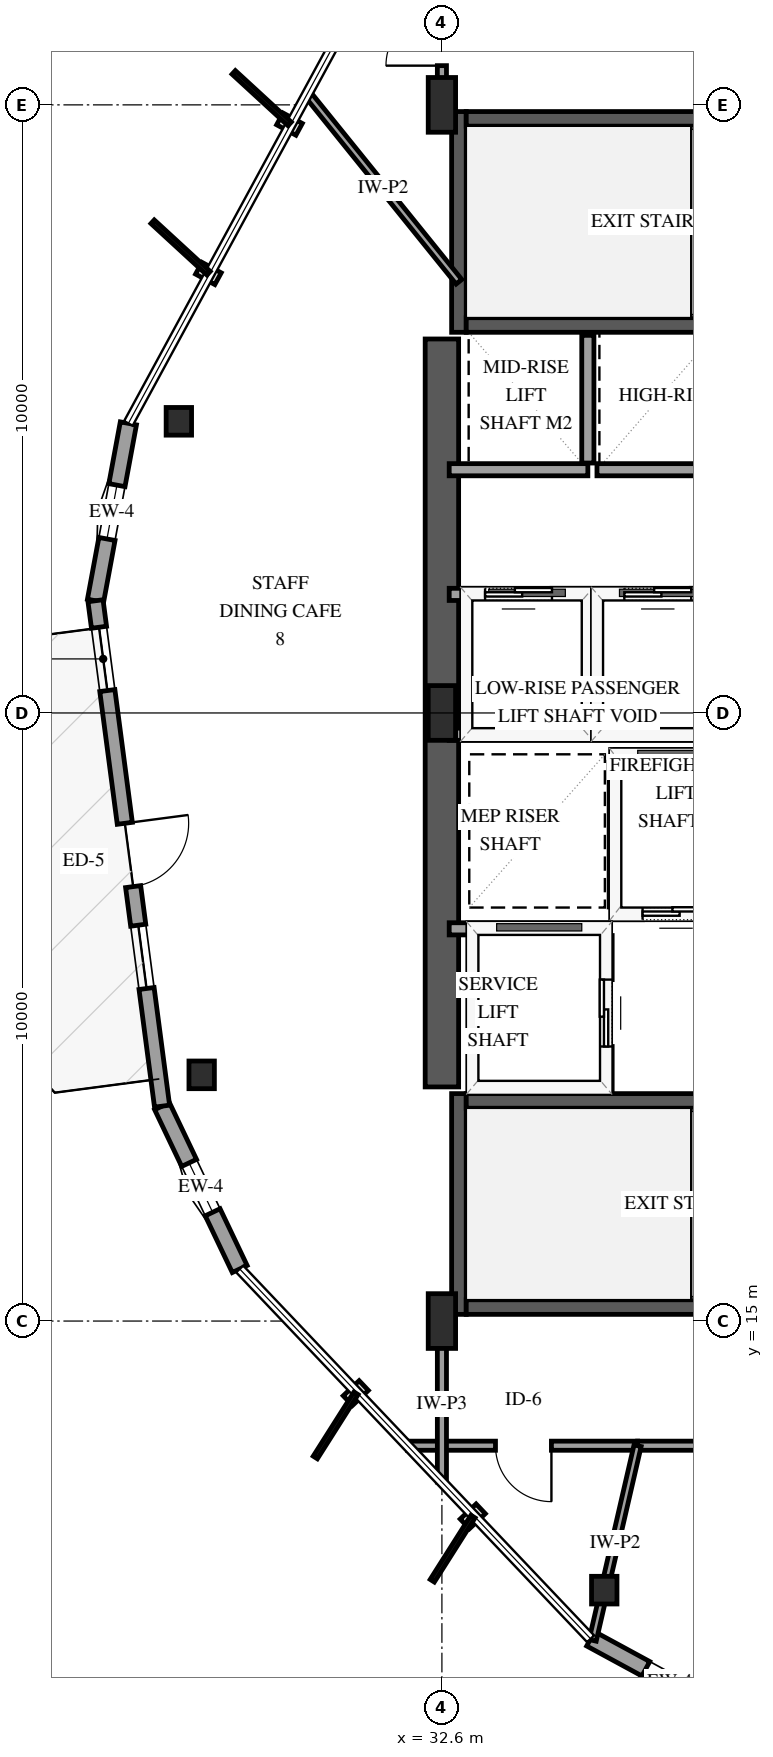
"""IFC4 building model, lengths in metres.
Left out: names, types, materials, properties, quantities, classifications, styles, units other than length and angle.
Written with IfcOpenShell. Run it as: python <this file> out.ifc"""

import sys

from ifc_helpers import new_model, si_unit, direction, frame, frame_2d, origin, origin_2d, place, context, subcontext, project, spatial, rectangle, i_section, extrude, element, fill, save


model = new_model("IFC4")
c1 = context("Model", 3, precision=1e-05, world=origin(), true_north=direction((0.0, 1.0)))
c2 = subcontext(c1, "Body", "Model", "MODEL_VIEW")
j1 = project(units=[si_unit("LENGTHUNIT", "METRE"), si_unit("PLANEANGLEUNIT", "RADIAN")], contexts=[c1])
p1 = place(None, origin())
s1 = spatial("IfcSite", under=j1, at=p1, CompositionType="ELEMENT")
p2 = place(p1, origin())
s2 = spatial("IfcBuilding", under=s1, at=p2, CompositionType="ELEMENT")
p3 = place(p2, frame((0.0, 0.0, 126.4)))
s3 = spatial("IfcBuildingStorey", under=s2, at=p3, CompositionType="ELEMENT", Elevation=126.4)
p4 = place(p3, frame((32.88, 15.11, 0.0), z_axis=(0.0, 0.0, 1.0), x_axis=(0.0, 1.0, 0.0)))
e1 = element("IfcWall", 1, at=p4, inside=s3, PredefinedType="SHEAR", context=c2, shape_type="SweptSolid", body=[
    extrude(rectangle(XDim=3.63, YDim=0.24, at=frame_2d((1.815, 0.0))), origin(), (0.0, 0.0, 1.0), 3.9),
])
for number, where, z_axis, x_axis in (
    (2, (33.0, 15.23, 0.0), (0.0, 0.0, 1.0), (1.0, 0.0, 0.0)),
    (3, (33.0, 18.62, 0.0), (0.0, 0.0, 1.0), (1.0, 0.0, 0.0)),
):
    element("IfcWall", number, at=place(p3, frame(where, z_axis=z_axis, x_axis=x_axis)), inside=s3, PredefinedType="SHEAR", context=c2, shape_type="SweptSolid", body=[
        extrude(rectangle(XDim=8.0, YDim=0.24, at=frame_2d((4.0, 0.0))), origin(), (0.0, 0.0, 1.0), 3.9),
    ])
p5 = place(p3, frame((32.88, 31.26, 0.0), z_axis=(0.0, 0.0, 1.0), x_axis=(0.0, 1.0, 0.0)))
e4 = element("IfcWall", 4, at=p5, inside=s3, PredefinedType="SHEAR", context=c2, shape_type="SweptSolid", body=[
    extrude(rectangle(XDim=3.63, YDim=0.24, at=frame_2d((1.815, 0.0))), origin(), (0.0, 0.0, 1.0), 3.9),
])
for number, where, z_axis, x_axis in (
    (5, (33.0, 31.38, 0.0), (0.0, 0.0, 1.0), (1.0, 0.0, 0.0)),
    (6, (33.0, 34.77, 0.0), (0.0, 0.0, 1.0), (1.0, 0.0, 0.0)),
):
    element("IfcWall", number, at=place(p3, frame(where, z_axis=z_axis, x_axis=x_axis)), inside=s3, PredefinedType="SHEAR", context=c2, shape_type="SweptSolid", body=[
        extrude(rectangle(XDim=8.0, YDim=0.24, at=frame_2d((4.0, 0.0))), origin(), (0.0, 0.0, 1.0), 3.9),
    ])
p6 = place(p3, frame((32.6, 18.85, 0.0), z_axis=(0.0, 0.0, 1.0), x_axis=(0.0, 1.0, 0.0)))
e7 = element("IfcWall", 7, at=p6, inside=s3, PredefinedType="SHEAR", context=c2, shape_type="SweptSolid", body=[
    extrude(rectangle(XDim=12.3, YDim=0.55, at=frame_2d((6.15, 0.0))), origin(), (0.0, 0.0, 1.0), 3.9),
])
for number, where, z_axis, x_axis in (
    (8, (32.6, 15.0, 0.0), (0.0, 0.0, 1.0), (1.0, 0.0, 0.0)),
    (9, (32.6, 25.0, 0.0), (0.0, 0.0, 1.0), (1.0, 0.0, 0.0)),
    (10, (32.6, 35.0, 0.0), (0.0, 0.0, 1.0), (1.0, 0.0, 0.0)),
):
    element("IfcColumn", number, at=place(p3, frame(where, z_axis=z_axis, x_axis=x_axis)), inside=s3, PredefinedType="PILASTER", context=c2, shape_type="SweptSolid", body=[
        extrude(rectangle(XDim=0.45, YDim=0.9, at=origin_2d()), origin(), (0.0, 0.0, 1.0), 3.9),
    ])
for number, where, z_axis, x_axis in (
    (11, (28.274, 29.796, 0.0), (0.0, 0.0, 1.0), (1.0, 0.0, 0.0)),
    (12, (28.649, 19.049, 0.0), (0.0, 0.0, 1.0), (1.0, 0.0, 0.0)),
    (13, (35.27, 10.575, 0.0), (0.0, 0.0, 1.0), (1.0, 0.0, 0.0)),
):
    element("IfcColumn", number, at=place(p3, frame(where, z_axis=z_axis, x_axis=x_axis)), inside=s3, PredefinedType="COLUMN", context=c2, shape_type="SweptSolid", body=[
        extrude(i_section(OverallWidth=0.418, OverallDepth=0.455, WebThickness=0.042, FlangeThickness=0.068, FilletRadius=0.038, at=origin_2d()), origin(), (0.0, 0.0, 1.0), 3.9),
    ])
p7 = place(p3, frame((27.444, 29.762, 0.0), z_axis=(0.0, 0.0, 1.0), x_axis=(-0.182295553122, -0.983243780205, 0.0)))
e14 = element("IfcWall", 14, at=p7, inside=s3, PredefinedType="SOLIDWALL", context=c2, shape_type="SweptSolid", body=[
    extrude(rectangle(XDim=2.967, YDim=0.27, at=frame_2d((1.483, 0.0))), origin(), (0.0, 0.0, 1.0), 2.979),
])
p8 = place(p7, frame((1.033, 0.0, 0.75)))
e15 = element("IfcOpeningElement", 15, at=p8, cuts=e14, PredefinedType="OPENING", context=c2, shape_type="SweptSolid", body=[
    extrude(rectangle(XDim=0.9, YDim=1.5, at=frame_2d((0.45, 0.75))), frame((0.0, 0.145, 0.0), z_axis=(0.0, -1.0, 0.0), x_axis=(1.0, 0.0, 0.0)), (0.0, 0.0, 1.0), 0.29),
])
p9 = place(p3, frame((27.998, 18.534, 0.0), z_axis=(0.0, 0.0, 1.0), x_axis=(0.430511722547, -0.902584985887, 0.0)))
e16 = element("IfcWall", 16, at=p9, inside=s3, PredefinedType="SOLIDWALL", context=c2, shape_type="SweptSolid", body=[
    extrude(rectangle(XDim=2.967, YDim=0.27, at=frame_2d((1.483, 0.0))), origin(), (0.0, 0.0, 1.0), 2.979),
])
p10 = place(p9, frame((1.033, 0.0, 0.75)))
e17 = element("IfcOpeningElement", 17, at=p10, cuts=e16, PredefinedType="OPENING", context=c2, shape_type="SweptSolid", body=[
    extrude(rectangle(XDim=0.9, YDim=1.5, at=frame_2d((0.45, 0.75))), frame((0.0, 0.145, 0.0), z_axis=(0.0, -1.0, 0.0), x_axis=(1.0, 0.0, 0.0)), (0.0, 0.0, 1.0), 0.29),
])
p11 = place(p3, frame((26.903, 26.845, 0.0), z_axis=(0.0, 0.0, 1.0), x_axis=(0.130551689343, -0.99144150428, 0.0)))
e18 = element("IfcWall", 18, at=p11, inside=s3, PredefinedType="SOLIDWALL", context=c2, shape_type="SweptSolid", body=[
    extrude(rectangle(XDim=8.384, YDim=0.25, at=frame_2d((4.192, 0.0))), origin(), (0.0, 0.0, 1.0), 2.979),
])
p12 = place(p11, frame((3.692, 0.0, 0.0)))
e19 = element("IfcOpeningElement", 19, at=p12, cuts=e18, PredefinedType="OPENING", context=c2, shape_type="SweptSolid", body=[
    extrude(rectangle(XDim=1.05, YDim=2.15, at=frame_2d((0.525, 1.075))), frame((0.0, 0.135, 0.0), z_axis=(0.0, -1.0, 0.0), x_axis=(1.0, 0.0, 0.0)), (0.0, 0.0, 1.0), 0.27),
])
p13 = place(p11, frame((0.44, 0.0, 0.72)))
e20 = element("IfcOpeningElement", 20, at=p13, cuts=e18, PredefinedType="OPENING", context=c2, shape_type="SweptSolid", body=[
    extrude(rectangle(XDim=1.05, YDim=1.55, at=frame_2d((0.525, 0.775))), frame((0.0, 0.135, 0.0), z_axis=(0.0, -1.0, 0.0), x_axis=(1.0, 0.0, 0.0)), (0.0, 0.0, 1.0), 0.27),
])
p14 = place(p11, frame((5.382, 0.0, 0.72)))
e21 = element("IfcOpeningElement", 21, at=p14, cuts=e18, PredefinedType="OPENING", context=c2, shape_type="SweptSolid", body=[
    extrude(rectangle(XDim=1.05, YDim=1.55, at=frame_2d((0.525, 0.775))), frame((0.0, 0.135, 0.0), z_axis=(0.0, -1.0, 0.0), x_axis=(1.0, 0.0, 0.0)), (0.0, 0.0, 1.0), 0.27),
])
p15 = place(p3, frame((35.046, 9.775, 0.0), z_axis=(0.0, 0.0, 1.0), x_axis=(0.878806101886, -0.477179039028, 0.0)))
e22 = element("IfcWall", 22, at=p15, inside=s3, PredefinedType="SOLIDWALL", context=c2, shape_type="SweptSolid", body=[
    extrude(rectangle(XDim=2.967, YDim=0.27, at=frame_2d((1.483, 0.0))), origin(), (0.0, 0.0, 1.0), 2.979),
])
p16 = place(p15, frame((1.033, 0.0, 0.75)))
e23 = element("IfcOpeningElement", 23, at=p16, cuts=e22, PredefinedType="OPENING", context=c2, shape_type="SweptSolid", body=[
    extrude(rectangle(XDim=0.9, YDim=1.5, at=frame_2d((0.45, 0.75))), frame((0.0, 0.145, 0.0), z_axis=(0.0, -1.0, 0.0), x_axis=(1.0, 0.0, 0.0)), (0.0, 0.0, 1.0), 0.29),
])
p17 = place(p3, frame((35.45, 21.7, 0.0), z_axis=(0.0, 0.0, 1.0), x_axis=(1.0, 0.0, 0.0)))
e24 = element("IfcWall", 24, at=p17, inside=s3, PredefinedType="SOLIDWALL", context=c2, shape_type="SweptSolid", body=[
    extrude(rectangle(XDim=2.0, YDim=0.2, at=frame_2d((1.0, 0.0))), origin(), (0.0, 0.0, 1.0), 3.6),
])
p18 = place(p17, frame((0.45, 0.0, 0.0)))
e25 = element("IfcOpeningElement", 25, at=p18, cuts=e24, PredefinedType="OPENING", context=c2, shape_type="SweptSolid", body=[
    extrude(rectangle(XDim=1.1, YDim=2.15, at=frame_2d((0.55, 1.075))), frame((0.0, 0.11, 0.0), z_axis=(0.0, -1.0, 0.0), x_axis=(1.0, 0.0, 0.0)), (0.0, 0.0, 1.0), 0.22),
])
p19 = place(p3, frame((35.45, 24.3, 0.0), z_axis=(0.0, 0.0, 1.0), x_axis=(1.0, 0.0, 0.0)))
e26 = element("IfcWall", 26, at=p19, inside=s3, PredefinedType="SOLIDWALL", context=c2, shape_type="SweptSolid", body=[
    extrude(rectangle(XDim=2.0, YDim=0.2, at=frame_2d((1.0, 0.0))), origin(), (0.0, 0.0, 1.0), 3.6),
])
p20 = place(p3, frame((35.45, 21.81, 0.0), z_axis=(0.0, 0.0, 1.0), x_axis=(0.0, 1.0, 0.0)))
e27 = element("IfcWall", 27, at=p20, inside=s3, PredefinedType="SOLIDWALL", context=c2, shape_type="SweptSolid", body=[
    extrude(rectangle(XDim=2.38, YDim=0.2, at=frame_2d((1.19, 0.0))), origin(), (0.0, 0.0, 1.0), 3.6),
])
p21 = place(p3, frame((32.72, 21.45, 0.0), z_axis=(0.0, 0.0, 1.0), x_axis=(1.0, 0.0, 0.0)))
e28 = element("IfcWall", 28, at=p21, inside=s3, PredefinedType="SOLIDWALL", context=c2, shape_type="SweptSolid", body=[
    extrude(rectangle(XDim=2.58, YDim=0.2, at=frame_2d((1.29, 0.0))), origin(), (0.0, 0.0, 1.0), 3.6),
])
p22 = place(p3, frame((35.3, 18.79, 0.0), z_axis=(0.0, 0.0, 1.0), x_axis=(0.0, 1.0, 0.0)))
e29 = element("IfcWall", 29, at=p22, inside=s3, PredefinedType="SOLIDWALL", context=c2, shape_type="SweptSolid", body=[
    extrude(rectangle(XDim=2.55, YDim=0.2, at=frame_2d((1.275, 0.0))), origin(), (0.0, 0.0, 1.0), 3.6),
])
p23 = place(p22, frame((0.725, 0.0, 0.0)))
e30 = element("IfcOpeningElement", 30, at=p23, cuts=e29, PredefinedType="OPENING", context=c2, shape_type="SweptSolid", body=[
    extrude(rectangle(XDim=1.1, YDim=2.15, at=frame_2d((0.55, 1.075))), frame((0.0, 0.11, 0.0), z_axis=(0.0, -1.0, 0.0), x_axis=(1.0, 0.0, 0.0)), (0.0, 0.0, 1.0), 0.22),
])
p24 = place(p3, frame((32.72, 24.65, 0.0), z_axis=(0.0, 0.0, 1.0), x_axis=(1.0, 0.0, 0.0)))
e31 = element("IfcWall", 31, at=p24, inside=s3, PredefinedType="SOLIDWALL", context=c2, shape_type="SweptSolid", body=[
    extrude(rectangle(XDim=2.28, YDim=0.2, at=frame_2d((1.14, 0.0))), origin(), (0.0, 0.0, 1.0), 3.6),
])
p25 = place(p3, frame((32.72, 26.95, 0.0), z_axis=(0.0, 0.0, 1.0), x_axis=(1.0, 0.0, 0.0)))
e32 = element("IfcWall", 32, at=p25, inside=s3, PredefinedType="SOLIDWALL", context=c2, shape_type="SweptSolid", body=[
    extrude(rectangle(XDim=2.28, YDim=0.2, at=frame_2d((1.14, 0.0))), origin(), (0.0, 0.0, 1.0), 3.6),
])
p26 = place(p25, frame((0.59, 0.0, 0.0)))
e33 = element("IfcOpeningElement", 33, at=p26, cuts=e32, PredefinedType="OPENING", context=c2, shape_type="SweptSolid", body=[
    extrude(rectangle(XDim=1.1, YDim=2.15, at=frame_2d((0.55, 1.075))), frame((0.0, 0.11, 0.0), z_axis=(0.0, -1.0, 0.0), x_axis=(1.0, 0.0, 0.0)), (0.0, 0.0, 1.0), 0.22),
])
p27 = place(p3, frame((35.0, 24.76, 0.0), z_axis=(0.0, 0.0, 1.0), x_axis=(0.0, 1.0, 0.0)))
e34 = element("IfcWall", 34, at=p27, inside=s3, PredefinedType="SOLIDWALL", context=c2, shape_type="SweptSolid", body=[
    extrude(rectangle(XDim=2.08, YDim=0.2, at=frame_2d((1.04, 0.0))), origin(), (0.0, 0.0, 1.0), 3.6),
])
p28 = place(p3, frame((35.15, 24.65, 0.0), z_axis=(0.0, 0.0, 1.0), x_axis=(1.0, 0.0, 0.0)))
e35 = element("IfcWall", 35, at=p28, inside=s3, PredefinedType="SOLIDWALL", context=c2, shape_type="SweptSolid", body=[
    extrude(rectangle(XDim=2.0, YDim=0.2, at=frame_2d((1.0, 0.0))), origin(), (0.0, 0.0, 1.0), 3.6),
])
p29 = place(p3, frame((35.15, 26.95, 0.0), z_axis=(0.0, 0.0, 1.0), x_axis=(1.0, 0.0, 0.0)))
e36 = element("IfcWall", 36, at=p29, inside=s3, PredefinedType="SOLIDWALL", context=c2, shape_type="SweptSolid", body=[
    extrude(rectangle(XDim=2.0, YDim=0.2, at=frame_2d((1.0, 0.0))), origin(), (0.0, 0.0, 1.0), 3.6),
])
p30 = place(p29, frame((0.45, 0.0, 0.0)))
e37 = element("IfcOpeningElement", 37, at=p30, cuts=e36, PredefinedType="OPENING", context=c2, shape_type="SweptSolid", body=[
    extrude(rectangle(XDim=1.1, YDim=2.15, at=frame_2d((0.55, 1.075))), frame((0.0, 0.11, 0.0), z_axis=(0.0, -1.0, 0.0), x_axis=(1.0, 0.0, 0.0)), (0.0, 0.0, 1.0), 0.22),
])
p31 = place(p3, frame((32.72, 29.0, 0.0), z_axis=(0.0, 0.0, 1.0), x_axis=(1.0, 0.0, 0.0)))
e38 = element("IfcWall", 38, at=p31, inside=s3, PredefinedType="SOLIDWALL", context=c2, shape_type="SweptSolid", body=[
    extrude(rectangle(XDim=2.28, YDim=0.2, at=frame_2d((1.14, 0.0))), origin(), (0.0, 0.0, 1.0), 3.6),
])
p32 = place(p3, frame((35.0, 29.11, 0.0), z_axis=(0.0, 0.0, 1.0), x_axis=(0.0, 1.0, 0.0)))
e39 = element("IfcWall", 39, at=p32, inside=s3, PredefinedType="SOLIDWALL", context=c2, shape_type="SweptSolid", body=[
    extrude(rectangle(XDim=2.1, YDim=0.2, at=frame_2d((1.05, 0.0))), origin(), (0.0, 0.0, 1.0), 3.6),
])
p33 = place(p3, frame((35.15, 29.0, 0.0), z_axis=(0.0, 0.0, 1.0), x_axis=(1.0, 0.0, 0.0)))
e40 = element("IfcWall", 40, at=p33, inside=s3, PredefinedType="SOLIDWALL", context=c2, shape_type="SweptSolid", body=[
    extrude(rectangle(XDim=2.0, YDim=0.2, at=frame_2d((1.0, 0.0))), origin(), (0.0, 0.0, 1.0), 3.6),
])
p34 = place(p3, frame((43.455, 12.95, 0.0), z_axis=(0.0, 0.0, 1.0), x_axis=(-1.0, 0.0, 0.0)))
e41 = element("IfcWall", 41, at=p34, inside=s3, PredefinedType="PARTITIONING", context=c2, shape_type="SweptSolid", body=[
    extrude(rectangle(XDim=7.637, YDim=0.15, at=frame_2d((3.818, 0.0))), origin(), (0.0, 0.0, 1.0), 3.6),
])
p35 = place(p34, frame((3.344, 0.0, 0.0)))
e42 = element("IfcOpeningElement", 42, at=p35, cuts=e41, PredefinedType="OPENING", context=c2, shape_type="SweptSolid", body=[
    extrude(rectangle(XDim=0.92, YDim=2.12, at=frame_2d((0.46, 1.06))), frame((0.0, 0.085, 0.0), z_axis=(0.0, -1.0, 0.0), x_axis=(1.0, 0.0, 0.0)), (0.0, 0.0, 1.0), 0.17),
])
p36 = place(p3, frame((32.88, 32.091, 0.0), z_axis=(0.0, 0.0, 1.0), x_axis=(-0.627801721524, 0.778373302761, 0.0)))
e43 = element("IfcWall", 43, at=p36, inside=s3, PredefinedType="PARTITIONING", context=c2, shape_type="SweptSolid", body=[
    extrude(rectangle(XDim=3.971, YDim=0.12, at=frame_2d((1.985, 0.0))), origin(), (0.0, 0.0, 1.0), 3.6),
])
p37 = place(p3, frame((35.818, 12.95, 0.0), z_axis=(0.0, 0.0, 1.0), x_axis=(-1.0, 0.0, 0.0)))
e44 = element("IfcWall", 44, at=p37, inside=s3, PredefinedType="PARTITIONING", context=c2, shape_type="SweptSolid", body=[
    extrude(rectangle(XDim=3.785, YDim=0.15, at=frame_2d((1.893, 0.0))), origin(), (0.0, 0.0, 1.0), 3.6),
])
p38 = place(p37, frame((1.417, 0.0, 0.0)))
e45 = element("IfcOpeningElement", 45, at=p38, cuts=e44, PredefinedType="OPENING", context=c2, shape_type="SweptSolid", body=[
    extrude(rectangle(XDim=0.92, YDim=2.12, at=frame_2d((0.46, 1.06))), frame((0.0, 0.085, 0.0), z_axis=(0.0, -1.0, 0.0), x_axis=(1.0, 0.0, 0.0)), (0.0, 0.0, 1.0), 0.17),
])
p39 = place(p3, frame((35.818, 12.95, 0.0), z_axis=(0.0, 0.0, 1.0), x_axis=(-0.224957203043, -0.974368645226, 0.0)))
e46 = element("IfcWall", 46, at=p39, inside=s3, PredefinedType="PARTITIONING", context=c2, shape_type="SweptSolid", body=[
    extrude(rectangle(XDim=3.285, YDim=0.12, at=frame_2d((1.643, 0.0))), origin(), (0.0, 0.0, 1.0), 2.895),
])
p40 = place(p3, frame((32.6, 12.352, 0.0), z_axis=(0.0, 0.0, 1.0), x_axis=(0.0, 1.0, 0.0)))
e47 = element("IfcWall", 47, at=p40, inside=s3, PredefinedType="PARTITIONING", context=c2, shape_type="SweptSolid", body=[
    extrude(rectangle(XDim=2.578, YDim=0.15, at=frame_2d((1.289, 0.0))), origin(), (0.0, 0.0, 1.0), 3.6),
])
p41 = place(p3, frame((32.6, 35.07, 0.0), z_axis=(0.0, 0.0, 1.0), x_axis=(0.0, 1.0, 0.0)))
e48 = element("IfcWall", 48, at=p41, inside=s3, PredefinedType="PARTITIONING", context=c2, shape_type="SweptSolid", body=[
    extrude(rectangle(XDim=1.91, YDim=0.15, at=frame_2d((0.955, 0.0))), origin(), (0.0, 0.0, 1.0), 3.6),
])
p42 = place(p41, frame((0.575, 0.0, 0.0)))
e49 = element("IfcOpeningElement", 49, at=p42, cuts=e48, PredefinedType="OPENING", context=c2, shape_type="SweptSolid", body=[
    extrude(rectangle(XDim=0.92, YDim=2.12, at=frame_2d((0.46, 1.06))), frame((0.0, 0.085, 0.0), z_axis=(0.0, -1.0, 0.0), x_axis=(1.0, 0.0, 0.0)), (0.0, 0.0, 1.0), 0.17),
])
p43 = place(p8, origin())
e50 = element("IfcWindow", 50, at=p43, inside=s3, PartitioningType="SINGLE_PANEL", PredefinedType="WINDOW", context=c2, shape_type="SweptSolid", body=[
    extrude(rectangle(XDim=0.9, YDim=1.5, at=frame_2d((0.45, 0.75))), frame((0.0, 0.03, 0.0), z_axis=(0.0, -1.0, 0.0), x_axis=(1.0, 0.0, 0.0)), (0.0, 0.0, 1.0), 0.06),
])
fill(e15, e50)
p44 = place(p10, origin())
e51 = element("IfcWindow", 51, at=p44, inside=s3, PartitioningType="SINGLE_PANEL", PredefinedType="WINDOW", context=c2, shape_type="SweptSolid", body=[
    extrude(rectangle(XDim=0.9, YDim=1.5, at=frame_2d((0.45, 0.75))), frame((0.0, 0.03, 0.0), z_axis=(0.0, -1.0, 0.0), x_axis=(1.0, 0.0, 0.0)), (0.0, 0.0, 1.0), 0.06),
])
fill(e17, e51)
p45 = place(p12, origin())
e52 = element("IfcDoor", 52, at=p45, inside=s3, OperationType="SINGLE_SWING_LEFT", PredefinedType="DOOR", context=c2, shape_type="SweptSolid", body=[
    extrude(rectangle(XDim=1.05, YDim=2.15, at=frame_2d((0.525, 1.075))), frame((0.0, 0.025, 0.0), z_axis=(0.0, -1.0, 0.0), x_axis=(1.0, 0.0, 0.0)), (0.0, 0.0, 1.0), 0.05),
])
fill(e19, e52)
p46 = place(p13, origin())
e53 = element("IfcWindow", 53, at=p46, inside=s3, PartitioningType="SINGLE_PANEL", PredefinedType="WINDOW", context=c2, shape_type="SweptSolid", body=[
    extrude(rectangle(XDim=1.05, YDim=1.55, at=frame_2d((0.525, 0.775))), frame((0.0, 0.03, 0.0), z_axis=(0.0, -1.0, 0.0), x_axis=(1.0, 0.0, 0.0)), (0.0, 0.0, 1.0), 0.06),
])
fill(e20, e53)
p47 = place(p14, origin())
e54 = element("IfcWindow", 54, at=p47, inside=s3, PartitioningType="SINGLE_PANEL", PredefinedType="WINDOW", context=c2, shape_type="SweptSolid", body=[
    extrude(rectangle(XDim=1.05, YDim=1.55, at=frame_2d((0.525, 0.775))), frame((0.0, 0.03, 0.0), z_axis=(0.0, -1.0, 0.0), x_axis=(1.0, 0.0, 0.0)), (0.0, 0.0, 1.0), 0.06),
])
fill(e21, e54)
p48 = place(p16, origin())
e55 = element("IfcWindow", 55, at=p48, inside=s3, PartitioningType="SINGLE_PANEL", PredefinedType="WINDOW", context=c2, shape_type="SweptSolid", body=[
    extrude(rectangle(XDim=0.9, YDim=1.5, at=frame_2d((0.45, 0.75))), frame((0.0, 0.03, 0.0), z_axis=(0.0, -1.0, 0.0), x_axis=(1.0, 0.0, 0.0)), (0.0, 0.0, 1.0), 0.06),
])
fill(e23, e55)
p49 = place(p18, origin())
e56 = element("IfcDoor", 56, at=p49, inside=s3, OperationType="SLIDING_TO_LEFT", PredefinedType="DOOR", context=c2, shape_type="SweptSolid", body=[
    extrude(rectangle(XDim=1.1, YDim=2.15, at=frame_2d((0.55, 1.075))), frame((0.0, 0.025, 0.0), z_axis=(0.0, -1.0, 0.0), x_axis=(1.0, 0.0, 0.0)), (0.0, 0.0, 1.0), 0.05),
])
fill(e25, e56)
p50 = place(p23, origin())
e57 = element("IfcDoor", 57, at=p50, inside=s3, OperationType="SLIDING_TO_LEFT", PredefinedType="DOOR", context=c2, shape_type="SweptSolid", body=[
    extrude(rectangle(XDim=1.1, YDim=2.15, at=frame_2d((0.55, 1.075))), frame((0.0, 0.025, 0.0), z_axis=(0.0, -1.0, 0.0), x_axis=(1.0, 0.0, 0.0)), (0.0, 0.0, 1.0), 0.05),
])
fill(e30, e57)
p51 = place(p26, origin())
e58 = element("IfcDoor", 58, at=p51, inside=s3, OperationType="SLIDING_TO_LEFT", PredefinedType="DOOR", context=c2, shape_type="SweptSolid", body=[
    extrude(rectangle(XDim=1.1, YDim=2.15, at=frame_2d((0.55, 1.075))), frame((0.0, 0.025, 0.0), z_axis=(0.0, -1.0, 0.0), x_axis=(1.0, 0.0, 0.0)), (0.0, 0.0, 1.0), 0.05),
])
fill(e33, e58)
p52 = place(p30, origin())
e59 = element("IfcDoor", 59, at=p52, inside=s3, OperationType="SLIDING_TO_LEFT", PredefinedType="DOOR", context=c2, shape_type="SweptSolid", body=[
    extrude(rectangle(XDim=1.1, YDim=2.15, at=frame_2d((0.55, 1.075))), frame((0.0, 0.025, 0.0), z_axis=(0.0, -1.0, 0.0), x_axis=(1.0, 0.0, 0.0)), (0.0, 0.0, 1.0), 0.05),
])
fill(e37, e59)
p53 = place(p38, origin())
e60 = element("IfcDoor", 60, at=p53, inside=s3, OperationType="SINGLE_SWING_LEFT", PredefinedType="DOOR", context=c2, shape_type="SweptSolid", body=[
    extrude(rectangle(XDim=0.92, YDim=2.12, at=frame_2d((0.46, 1.06))), frame((0.0, 0.025, 0.0), z_axis=(0.0, -1.0, 0.0), x_axis=(1.0, 0.0, 0.0)), (0.0, 0.0, 1.0), 0.05),
])
fill(e45, e60)
p54 = place(p42, origin())
e61 = element("IfcDoor", 61, at=p54, inside=s3, OperationType="SINGLE_SWING_LEFT", PredefinedType="DOOR", context=c2, shape_type="SweptSolid", body=[
    extrude(rectangle(XDim=0.92, YDim=2.12, at=frame_2d((0.46, 1.06))), frame((0.0, 0.025, 0.0), z_axis=(0.0, -1.0, 0.0), x_axis=(1.0, 0.0, 0.0)), (0.0, 0.0, 1.0), 0.05),
])
fill(e49, e61)
save(model, sys.argv[1])
